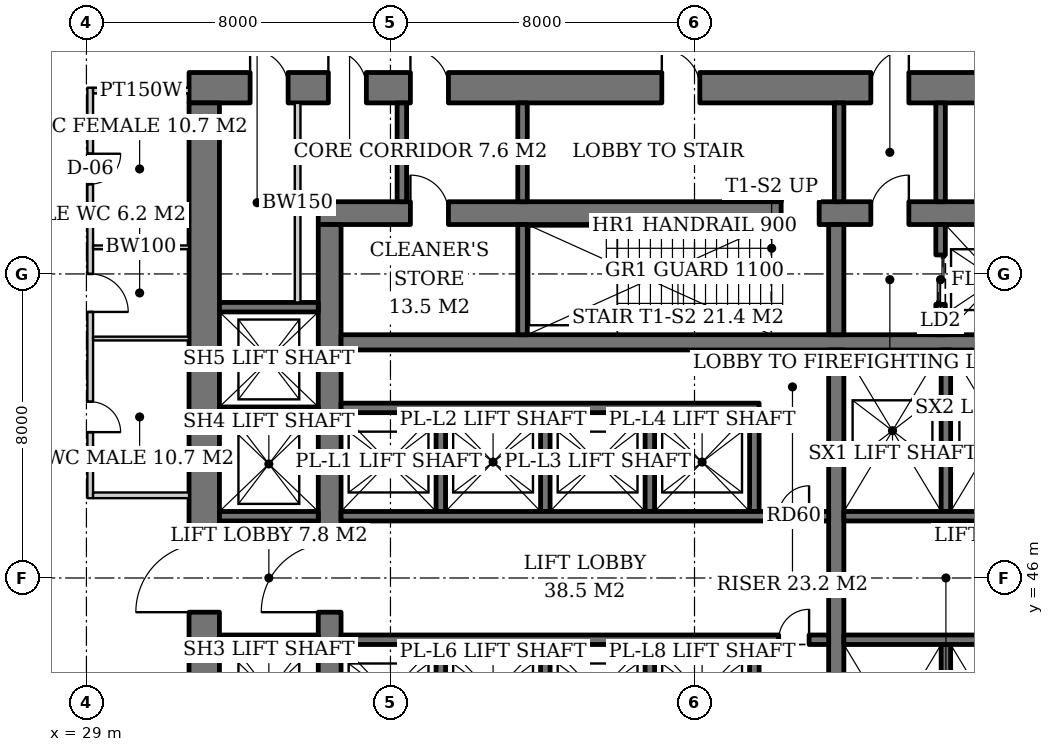
"""IFC4 building model, lengths in metres.
Left out: names, types, materials, properties, quantities, classifications, styles, units other than length and angle.
Written with IfcOpenShell. Run it as: python <this file> out.ifc"""

import sys

from ifc_helpers import new_model, si_unit, direction, frame, frame_2d, origin, place, context, subcontext, project, spatial, rectangle, extrude, element, fill, save


model = new_model("IFC4")
c1 = context("Model", 3, precision=1e-05, world=origin(), true_north=direction((0.0, 1.0)))
c2 = subcontext(c1, "Body", "Model", "MODEL_VIEW")
j1 = project(units=[si_unit("LENGTHUNIT", "METRE"), si_unit("PLANEANGLEUNIT", "RADIAN")], contexts=[c1])
p1 = place(None, origin())
s1 = spatial("IfcSite", under=j1, at=p1, CompositionType="ELEMENT")
p2 = place(p1, origin())
s2 = spatial("IfcBuilding", under=s1, at=p2, CompositionType="ELEMENT")
p3 = place(p2, frame((0.0, 0.0, 11.0)))
s3 = spatial("IfcBuildingStorey", under=s2, at=p3, CompositionType="ELEMENT", Elevation=11.0)
p4 = place(p3, frame((35.1, 55.6, 0.0), z_axis=(0.0, 0.0, 1.0), x_axis=(1.0, 0.0, 0.0)))
e1 = element("IfcWall", 1, at=p4, inside=s3, PredefinedType="SHEAR", context=c2, shape_type="SweptSolid", body=[
    extrude(rectangle(XDim=19.8, YDim=0.6, at=frame_2d((9.9, 0.0))), origin(), (0.0, 0.0, 1.0), 5.0),
])
p5 = place(p4, frame((14.54, 0.0, 0.0)))
e2 = element("IfcOpeningElement", 2, at=p5, cuts=e1, PredefinedType="OPENING", context=c2, shape_type="SweptSolid", body=[
    extrude(rectangle(XDim=1.0, YDim=2.1, at=frame_2d((0.5, 1.05))), frame((0.0, 0.31, 0.0), z_axis=(0.0, -1.0, 0.0), x_axis=(1.0, 0.0, 0.0)), (0.0, 0.0, 1.0), 0.62),
])
p6 = place(p4, frame((12.18, 0.0, 0.0)))
e3 = element("IfcOpeningElement", 3, at=p6, cuts=e1, PredefinedType="OPENING", context=c2, shape_type="SweptSolid", body=[
    extrude(rectangle(XDim=1.0, YDim=2.1, at=frame_2d((0.5, 1.05))), frame((0.0, 0.31, 0.0), z_axis=(0.0, -1.0, 0.0), x_axis=(1.0, 0.0, 0.0)), (0.0, 0.0, 1.0), 0.62),
])
p7 = place(p4, frame((2.425, 0.0, 0.0)))
e4 = element("IfcOpeningElement", 4, at=p7, cuts=e1, PredefinedType="OPENING", context=c2, shape_type="SweptSolid", body=[
    extrude(rectangle(XDim=1.0, YDim=2.1, at=frame_2d((0.5, 1.05))), frame((0.0, 0.31, 0.0), z_axis=(0.0, -1.0, 0.0), x_axis=(1.0, 0.0, 0.0)), (0.0, 0.0, 1.0), 0.62),
])
p8 = place(p3, frame((35.4, 36.7, 0.0), z_axis=(0.0, 0.0, 1.0), x_axis=(0.0, 1.0, 0.0)))
e5 = element("IfcWall", 5, at=p8, inside=s3, PredefinedType="SHEAR", context=c2, shape_type="SweptSolid", body=[
    extrude(rectangle(XDim=18.6, YDim=0.6, at=frame_2d((9.3, 0.0))), origin(), (0.0, 0.0, 1.0), 5.0),
])
p9 = place(p8, frame((8.4, 0.0, 0.0)))
e6 = element("IfcOpeningElement", 6, at=p9, cuts=e5, PredefinedType="OPENING", context=c2, shape_type="SweptSolid", body=[
    extrude(rectangle(XDim=1.8, YDim=2.4, at=frame_2d((0.9, 1.2))), frame((0.0, 0.31, 0.0), z_axis=(0.0, -1.0, 0.0), x_axis=(1.0, 0.0, 0.0)), (0.0, 0.0, 1.0), 0.62),
])
p10 = place(p3, frame((31.7, 58.9, 0.0), z_axis=(0.0, 0.0, 1.0), x_axis=(1.0, 0.0, 0.0)))
e7 = element("IfcWall", 7, at=p10, inside=s3, PredefinedType="SHEAR", context=c2, shape_type="SweptSolid", body=[
    extrude(rectangle(XDim=26.6, YDim=0.8, at=frame_2d((13.3, 0.0))), origin(), (0.0, 0.0, 1.0), 5.0),
])
p11 = place(p10, frame((17.94, 0.0, 0.0)))
e8 = element("IfcOpeningElement", 8, at=p11, cuts=e7, PredefinedType="OPENING", context=c2, shape_type="SweptSolid", body=[
    extrude(rectangle(XDim=1.0, YDim=2.1, at=frame_2d((0.5, 1.05))), frame((0.0, 0.41, 0.0), z_axis=(0.0, -1.0, 0.0), x_axis=(1.0, 0.0, 0.0)), (0.0, 0.0, 1.0), 0.82),
])
p12 = place(p10, frame((12.44, 0.0, 0.0)))
e9 = element("IfcOpeningElement", 9, at=p12, cuts=e7, PredefinedType="OPENING", context=c2, shape_type="SweptSolid", body=[
    extrude(rectangle(XDim=1.0, YDim=2.1, at=frame_2d((0.5, 1.05))), frame((0.0, 0.41, 0.0), z_axis=(0.0, -1.0, 0.0), x_axis=(1.0, 0.0, 0.0)), (0.0, 0.0, 1.0), 0.82),
])
p13 = place(p10, frame((5.825, 0.0, 0.0)))
e10 = element("IfcOpeningElement", 10, at=p13, cuts=e7, PredefinedType="OPENING", context=c2, shape_type="SweptSolid", body=[
    extrude(rectangle(XDim=1.0, YDim=2.1, at=frame_2d((0.5, 1.05))), frame((0.0, 0.41, 0.0), z_axis=(0.0, -1.0, 0.0), x_axis=(1.0, 0.0, 0.0)), (0.0, 0.0, 1.0), 0.82),
])
p14 = place(p10, frame((1.607, 0.0, 0.0)))
e11 = element("IfcOpeningElement", 11, at=p14, cuts=e7, PredefinedType="OPENING", context=c2, shape_type="SweptSolid", body=[
    extrude(rectangle(XDim=1.0, YDim=2.1, at=frame_2d((0.5, 1.05))), frame((0.0, 0.41, 0.0), z_axis=(0.0, -1.0, 0.0), x_axis=(1.0, 0.0, 0.0)), (0.0, 0.0, 1.0), 0.82),
])
p15 = place(p10, frame((3.666, 0.0, 0.0)))
e12 = element("IfcOpeningElement", 12, at=p15, cuts=e7, PredefinedType="OPENING", context=c2, shape_type="SweptSolid", body=[
    extrude(rectangle(XDim=1.0, YDim=2.1, at=frame_2d((0.5, 1.05))), frame((0.0, 0.41, 0.0), z_axis=(0.0, -1.0, 0.0), x_axis=(1.0, 0.0, 0.0)), (0.0, 0.0, 1.0), 0.82),
])
p16 = place(p10, frame((22.35, 0.0, 0.0)))
e13 = element("IfcOpeningElement", 13, at=p16, cuts=e7, PredefinedType="OPENING", context=c2, shape_type="SweptSolid", body=[
    extrude(rectangle(XDim=1.0, YDim=2.1, at=frame_2d((0.5, 1.05))), frame((0.0, 0.41, 0.0), z_axis=(0.0, -1.0, 0.0), x_axis=(1.0, 0.0, 0.0)), (0.0, 0.0, 1.0), 0.82),
])
p17 = place(p3, frame((32.1, 33.5, 0.0), z_axis=(0.0, 0.0, 1.0), x_axis=(0.0, 1.0, 0.0)))
e14 = element("IfcWall", 14, at=p17, inside=s3, PredefinedType="SHEAR", context=c2, shape_type="SweptSolid", body=[
    extrude(rectangle(XDim=25.0, YDim=0.8, at=frame_2d((12.5, 0.0))), origin(), (0.0, 0.0, 1.0), 5.0),
])
p18 = place(p17, frame((11.6, 0.0, 0.0)))
e15 = element("IfcOpeningElement", 15, at=p18, cuts=e14, PredefinedType="OPENING", context=c2, shape_type="SweptSolid", body=[
    extrude(rectangle(XDim=1.8, YDim=2.4, at=frame_2d((0.9, 1.2))), frame((0.0, 0.41, 0.0), z_axis=(0.0, -1.0, 0.0), x_axis=(1.0, 0.0, 0.0)), (0.0, 0.0, 1.0), 0.82),
])
p19 = place(p3, frame((35.7, 52.2, 0.0), z_axis=(0.0, 0.0, 1.0), x_axis=(1.0, 0.0, 0.0)))
e16 = element("IfcWall", 16, at=p19, inside=s3, PredefinedType="SHEAR", context=c2, shape_type="SweptSolid", body=[
    extrude(rectangle(XDim=18.6, YDim=0.4, at=frame_2d((9.3, 0.0))), origin(), (0.0, 0.0, 1.0), 5.0),
])
p20 = place(p3, frame((48.73, 40.0, 0.0), z_axis=(0.0, 0.0, 1.0), x_axis=(0.0, 1.0, 0.0)))
e17 = element("IfcWall", 17, at=p20, inside=s3, PredefinedType="SHEAR", context=c2, shape_type="SweptSolid", body=[
    extrude(rectangle(XDim=12.0, YDim=0.4, at=frame_2d((6.0, 0.0))), origin(), (0.0, 0.0, 1.0), 5.0),
])
p21 = place(p3, frame((48.73, 52.4, 0.0), z_axis=(0.0, 0.0, 1.0), x_axis=(0.0, 1.0, 0.0)))
e18 = element("IfcWall", 18, at=p21, inside=s3, PredefinedType="SHEAR", context=c2, shape_type="SweptSolid", body=[
    extrude(rectangle(XDim=2.9, YDim=0.4, at=frame_2d((1.45, 0.0))), origin(), (0.0, 0.0, 1.0), 5.0),
])
p22 = place(p3, frame((40.475, 52.4, 0.0), z_axis=(0.0, 0.0, 1.0), x_axis=(0.0, 1.0, 0.0)))
e19 = element("IfcWall", 19, at=p22, inside=s3, PredefinedType="SHEAR", context=c2, shape_type="SweptSolid", body=[
    extrude(rectangle(XDim=2.9, YDim=0.25, at=frame_2d((1.45, 0.0))), origin(), (0.0, 0.0, 1.0), 5.0),
])
p23 = place(p3, frame((51.475, 52.4, 0.0), z_axis=(0.0, 0.0, 1.0), x_axis=(0.0, 1.0, 0.0)))
e20 = element("IfcWall", 20, at=p23, inside=s3, PredefinedType="SHEAR", context=c2, shape_type="SweptSolid", body=[
    extrude(rectangle(XDim=2.9, YDim=0.25, at=frame_2d((1.45, 0.0))), origin(), (0.0, 0.0, 1.0), 5.0),
])
p24 = place(p23, frame((0.8, 0.0, 0.0)))
e21 = element("IfcOpeningElement", 21, at=p24, cuts=e20, PredefinedType="OPENING", context=c2, shape_type="SweptSolid", body=[
    extrude(rectangle(XDim=1.3, YDim=2.2, at=frame_2d((0.65, 1.1))), frame((0.0, 0.135, 0.0), z_axis=(0.0, -1.0, 0.0), x_axis=(1.0, 0.0, 0.0)), (0.0, 0.0, 1.0), 0.27),
])
for number, where, z_axis, x_axis in (
    (22, (38.325, 47.75, 0.0), (0.0, 0.0, 1.0), (0.0, 1.0, 0.0)),
    (23, (41.075, 47.75, 0.0), (0.0, 0.0, 1.0), (0.0, 1.0, 0.0)),
    (24, (43.825, 47.75, 0.0), (0.0, 0.0, 1.0), (0.0, 1.0, 0.0)),
    (25, (46.575, 47.75, 0.0), (0.0, 0.0, 1.0), (0.0, 1.0, 0.0)),
):
    element("IfcWall", number, at=place(p3, frame(where, z_axis=z_axis, x_axis=x_axis)), inside=s3, PredefinedType="SHEAR", context=c2, shape_type="SweptSolid", body=[
        extrude(rectangle(XDim=2.6, YDim=0.25, at=frame_2d((1.3, 0.0))), origin(), (0.0, 0.0, 1.0), 5.0),
    ])
p25 = place(p3, frame((35.7, 50.475, 0.0), z_axis=(0.0, 0.0, 1.0), x_axis=(1.0, 0.0, 0.0)))
e26 = element("IfcWall", 26, at=p25, inside=s3, PredefinedType="SHEAR", context=c2, shape_type="SweptSolid", body=[
    extrude(rectangle(XDim=11.0, YDim=0.25, at=frame_2d((5.5, 0.0))), origin(), (0.0, 0.0, 1.0), 5.0),
])
p26 = place(p3, frame((35.7, 47.625, 0.0), z_axis=(0.0, 0.0, 1.0), x_axis=(1.0, 0.0, 0.0)))
e27 = element("IfcWall", 27, at=p26, inside=s3, PredefinedType="SHEAR", context=c2, shape_type="SweptSolid", body=[
    extrude(rectangle(XDim=12.83, YDim=0.25, at=frame_2d((6.415, 0.0))), origin(), (0.0, 0.0, 1.0), 5.0),
])
p27 = place(p26, frame((11.515, 0.0, 0.0)))
e28 = element("IfcOpeningElement", 28, at=p27, cuts=e27, PredefinedType="OPENING", context=c2, shape_type="SweptSolid", body=[
    extrude(rectangle(XDim=0.8, YDim=2.0, at=frame_2d((0.4, 1.0))), frame((0.0, 0.135, 0.0), z_axis=(0.0, -1.0, 0.0), x_axis=(1.0, 0.0, 0.0)), (0.0, 0.0, 1.0), 0.27),
])
for number, where, z_axis, x_axis in (
    (29, (38.325, 44.25, 0.0), (0.0, 0.0, 1.0), (0.0, -1.0, 0.0)),
    (30, (41.075, 44.25, 0.0), (0.0, 0.0, 1.0), (0.0, -1.0, 0.0)),
    (31, (43.825, 44.25, 0.0), (0.0, 0.0, 1.0), (0.0, -1.0, 0.0)),
    (32, (46.575, 44.25, 0.0), (0.0, 0.0, 1.0), (0.0, -1.0, 0.0)),
):
    element("IfcWall", number, at=place(p3, frame(where, z_axis=z_axis, x_axis=x_axis)), inside=s3, PredefinedType="SHEAR", context=c2, shape_type="SweptSolid", body=[
        extrude(rectangle(XDim=2.6, YDim=0.25, at=frame_2d((1.3, 0.0))), origin(), (0.0, 0.0, 1.0), 5.0),
    ])
p28 = place(p3, frame((35.7, 44.375, 0.0), z_axis=(0.0, 0.0, 1.0), x_axis=(1.0, 0.0, 0.0)))
e33 = element("IfcWall", 33, at=p28, inside=s3, PredefinedType="SHEAR", context=c2, shape_type="SweptSolid", body=[
    extrude(rectangle(XDim=12.83, YDim=0.25, at=frame_2d((6.415, 0.0))), origin(), (0.0, 0.0, 1.0), 5.0),
])
p29 = place(p28, frame((11.515, 0.0, 0.0)))
e34 = element("IfcOpeningElement", 34, at=p29, cuts=e33, PredefinedType="OPENING", context=c2, shape_type="SweptSolid", body=[
    extrude(rectangle(XDim=0.8, YDim=2.0, at=frame_2d((0.4, 1.0))), frame((0.0, 0.135, 0.0), z_axis=(0.0, -1.0, 0.0), x_axis=(1.0, 0.0, 0.0)), (0.0, 0.0, 1.0), 0.27),
])
p30 = place(p3, frame((51.615, 47.75, 0.0), z_axis=(0.0, 0.0, 1.0), x_axis=(0.0, 1.0, 0.0)))
e35 = element("IfcWall", 35, at=p30, inside=s3, PredefinedType="SHEAR", context=c2, shape_type="SweptSolid", body=[
    extrude(rectangle(XDim=4.25, YDim=0.25, at=frame_2d((2.125, 0.0))), origin(), (0.0, 0.0, 1.0), 5.0),
])
p31 = place(p3, frame((48.93, 47.625, 0.0), z_axis=(0.0, 0.0, 1.0), x_axis=(1.0, 0.0, 0.0)))
e36 = element("IfcWall", 36, at=p31, inside=s3, PredefinedType="SHEAR", context=c2, shape_type="SweptSolid", body=[
    extrude(rectangle(XDim=5.37, YDim=0.25, at=frame_2d((2.685, 0.0))), origin(), (0.0, 0.0, 1.0), 5.0),
])
p32 = place(p3, frame((51.615, 44.25, 0.0), z_axis=(0.0, 0.0, 1.0), x_axis=(0.0, -1.0, 0.0)))
e37 = element("IfcWall", 37, at=p32, inside=s3, PredefinedType="SHEAR", context=c2, shape_type="SweptSolid", body=[
    extrude(rectangle(XDim=4.25, YDim=0.25, at=frame_2d((2.125, 0.0))), origin(), (0.0, 0.0, 1.0), 5.0),
])
p33 = place(p3, frame((48.93, 44.375, 0.0), z_axis=(0.0, 0.0, 1.0), x_axis=(1.0, 0.0, 0.0)))
e38 = element("IfcWall", 38, at=p33, inside=s3, PredefinedType="SHEAR", context=c2, shape_type="SweptSolid", body=[
    extrude(rectangle(XDim=5.37, YDim=0.25, at=frame_2d((2.685, 0.0))), origin(), (0.0, 0.0, 1.0), 5.0),
])
for number, where, z_axis, x_axis in (
    (39, (32.5, 44.375, 0.0), (0.0, 0.0, 1.0), (1.0, 0.0, 0.0)),
    (40, (32.5, 47.625, 0.0), (0.0, 0.0, 1.0), (1.0, 0.0, 0.0)),
    (41, (32.5, 50.375, 0.0), (0.0, 0.0, 1.0), (1.0, 0.0, 0.0)),
    (42, (32.5, 53.125, 0.0), (0.0, 0.0, 1.0), (1.0, 0.0, 0.0)),
):
    element("IfcWall", number, at=place(p3, frame(where, z_axis=z_axis, x_axis=x_axis)), inside=s3, PredefinedType="SHEAR", context=c2, shape_type="SweptSolid", body=[
        extrude(rectangle(XDim=2.6, YDim=0.25, at=frame_2d((1.3, 0.0))), origin(), (0.0, 0.0, 1.0), 5.0),
    ])
for number, where, z_axis, x_axis in (
    (43, (48.805, 55.9, 0.0), (0.0, 0.0, 1.0), (0.0, 1.0, 0.0)),
    (44, (51.475, 55.9, 0.0), (0.0, 0.0, 1.0), (0.0, 1.0, 0.0)),
    (45, (40.475, 55.9, 0.0), (0.0, 0.0, 1.0), (0.0, 1.0, 0.0)),
    (46, (37.3, 55.9, 0.0), (0.0, 0.0, 1.0), (0.0, 1.0, 0.0)),
):
    element("IfcWall", number, at=place(p3, frame(where, z_axis=z_axis, x_axis=x_axis)), inside=s3, PredefinedType="SOLIDWALL", context=c2, shape_type="SweptSolid", body=[
        extrude(rectangle(XDim=2.6, YDim=0.25, at=frame_2d((1.3, 0.0))), origin(), (0.0, 0.0, 1.0), 4.7),
    ])
p34 = place(p3, frame((34.557, 53.25, 0.0), z_axis=(0.0, 0.0, 1.0), x_axis=(0.0, 1.0, 0.0)))
e47 = element("IfcWall", 47, at=p34, inside=s3, PredefinedType="SOLIDWALL", context=c2, shape_type="SweptSolid", body=[
    extrude(rectangle(XDim=5.25, YDim=0.15, at=frame_2d((2.625, 0.0))), origin(), (0.0, 0.0, 1.0), 4.7),
])
p35 = place(p3, frame((29.1, 58.9, 0.0), z_axis=(0.0, 0.0, 1.0), x_axis=(0.0, -1.0, 0.0)))
e48 = element("IfcWall", 48, at=p35, inside=s3, PredefinedType="PARTITIONING", context=c2, shape_type="SweptSolid", body=[
    extrude(rectangle(XDim=10.8, YDim=0.15, at=frame_2d((5.4, 0.0))), origin(), (0.0, 0.0, 1.0), 3.688),
])
p36 = place(p35, frame((1.738, 0.0, 0.0)))
e49 = element("IfcOpeningElement", 49, at=p36, cuts=e48, PredefinedType="OPENING", context=c2, shape_type="SweptSolid", body=[
    extrude(rectangle(XDim=0.8, YDim=2.1, at=frame_2d((0.4, 1.05))), frame((0.0, 0.085, 0.0), z_axis=(0.0, -1.0, 0.0), x_axis=(1.0, 0.0, 0.0)), (0.0, 0.0, 1.0), 0.17),
])
p37 = place(p35, frame((4.9, 0.0, 0.0)))
e50 = element("IfcOpeningElement", 50, at=p37, cuts=e48, PredefinedType="OPENING", context=c2, shape_type="SweptSolid", body=[
    extrude(rectangle(XDim=1.0, YDim=2.1, at=frame_2d((0.5, 1.05))), frame((0.0, 0.085, 0.0), z_axis=(0.0, -1.0, 0.0), x_axis=(1.0, 0.0, 0.0)), (0.0, 0.0, 1.0), 0.17),
])
p38 = place(p35, frame((8.262, 0.0, 0.0)))
e51 = element("IfcOpeningElement", 51, at=p38, cuts=e48, PredefinedType="OPENING", context=c2, shape_type="SweptSolid", body=[
    extrude(rectangle(XDim=0.8, YDim=2.1, at=frame_2d((0.4, 1.05))), frame((0.0, 0.085, 0.0), z_axis=(0.0, -1.0, 0.0), x_axis=(1.0, 0.0, 0.0)), (0.0, 0.0, 1.0), 0.17),
])
p39 = place(p3, frame((29.175, 58.825, 0.0), z_axis=(0.0, 0.0, 1.0), x_axis=(1.0, 0.0, 0.0)))
e52 = element("IfcWall", 52, at=p39, inside=s3, PredefinedType="PARTITIONING", context=c2, shape_type="SweptSolid", body=[
    extrude(rectangle(XDim=2.525, YDim=0.15, at=frame_2d((1.262, 0.0))), origin(), (0.0, 0.0, 1.0), 3.688),
])
p40 = place(p3, frame((29.175, 54.7, 0.0), z_axis=(0.0, 0.0, 1.0), x_axis=(1.0, 0.0, 0.0)))
e53 = element("IfcWall", 53, at=p40, inside=s3, PredefinedType="SOLIDWALL", context=c2, shape_type="SweptSolid", body=[
    extrude(rectangle(XDim=2.525, YDim=0.1, at=frame_2d((1.262, 0.0))), origin(), (0.0, 0.0, 1.0), 3.9),
])
p41 = place(p3, frame((29.175, 52.3, 0.0), z_axis=(0.0, 0.0, 1.0), x_axis=(1.0, 0.0, 0.0)))
e54 = element("IfcWall", 54, at=p41, inside=s3, PredefinedType="SOLIDWALL", context=c2, shape_type="SweptSolid", body=[
    extrude(rectangle(XDim=2.525, YDim=0.1, at=frame_2d((1.262, 0.0))), origin(), (0.0, 0.0, 1.0), 4.7),
])
p42 = place(p3, frame((29.175, 48.175, 0.0), z_axis=(0.0, 0.0, 1.0), x_axis=(1.0, 0.0, 0.0)))
e55 = element("IfcWall", 55, at=p42, inside=s3, PredefinedType="PARTITIONING", context=c2, shape_type="SweptSolid", body=[
    extrude(rectangle(XDim=2.525, YDim=0.15, at=frame_2d((1.262, 0.0))), origin(), (0.0, 0.0, 1.0), 4.7),
])
p43 = place(p24, origin())
e56 = element("IfcDoor", 56, at=p43, inside=s3, OperationType="DOUBLE_DOOR_SLIDING", PredefinedType="DOOR", context=c2, shape_type="SweptSolid", body=[
    extrude(rectangle(XDim=1.3, YDim=2.2, at=frame_2d((0.65, 1.1))), frame((0.0, 0.025, 0.0), z_axis=(0.0, -1.0, 0.0), x_axis=(1.0, 0.0, 0.0)), (0.0, 0.0, 1.0), 0.05),
])
fill(e21, e56)
p44 = place(p27, origin())
e57 = element("IfcDoor", 57, at=p44, inside=s3, OperationType="SINGLE_SWING_RIGHT", PredefinedType="DOOR", context=c2, shape_type="SweptSolid", body=[
    extrude(rectangle(XDim=0.8, YDim=2.0, at=frame_2d((0.4, 1.0))), frame((0.0, 0.025, 0.0), z_axis=(0.0, -1.0, 0.0), x_axis=(1.0, 0.0, 0.0)), (0.0, 0.0, 1.0), 0.05),
])
fill(e28, e57)
p45 = place(p29, origin())
e58 = element("IfcDoor", 58, at=p45, inside=s3, OperationType="SINGLE_SWING_RIGHT", PredefinedType="DOOR", context=c2, shape_type="SweptSolid", body=[
    extrude(rectangle(XDim=0.8, YDim=2.0, at=frame_2d((0.4, 1.0))), frame((0.0, 0.025, 0.0), z_axis=(0.0, -1.0, 0.0), x_axis=(1.0, 0.0, 0.0)), (0.0, 0.0, 1.0), 0.05),
])
fill(e34, e58)
p46 = place(p5, origin())
e59 = element("IfcDoor", 59, at=p46, inside=s3, OperationType="SINGLE_SWING_RIGHT", PredefinedType="DOOR", context=c2, shape_type="SweptSolid", body=[
    extrude(rectangle(XDim=1.0, YDim=2.1, at=frame_2d((0.5, 1.05))), frame((0.0, 0.025, 0.0), z_axis=(0.0, -1.0, 0.0), x_axis=(1.0, 0.0, 0.0)), (0.0, 0.0, 1.0), 0.05),
])
fill(e2, e59)
p47 = place(p9, origin())
e60 = element("IfcDoor", 60, at=p47, inside=s3, OperationType="DOUBLE_DOOR_SINGLE_SWING", PredefinedType="DOOR", context=c2, shape_type="SweptSolid", body=[
    extrude(rectangle(XDim=1.8, YDim=2.4, at=frame_2d((0.9, 1.2))), frame((0.0, 0.025, 0.0), z_axis=(0.0, -1.0, 0.0), x_axis=(1.0, 0.0, 0.0)), (0.0, 0.0, 1.0), 0.05),
])
fill(e6, e60)
p48 = place(p6, origin())
e61 = element("IfcDoor", 61, at=p48, inside=s3, OperationType="SINGLE_SWING_RIGHT", PredefinedType="DOOR", context=c2, shape_type="SweptSolid", body=[
    extrude(rectangle(XDim=1.0, YDim=2.1, at=frame_2d((0.5, 1.05))), frame((0.0, 0.025, 0.0), z_axis=(0.0, -1.0, 0.0), x_axis=(1.0, 0.0, 0.0)), (0.0, 0.0, 1.0), 0.05),
])
fill(e3, e61)
p49 = place(p18, origin())
e62 = element("IfcDoor", 62, at=p49, inside=s3, OperationType="DOUBLE_DOOR_SINGLE_SWING", PredefinedType="DOOR", context=c2, shape_type="SweptSolid", body=[
    extrude(rectangle(XDim=1.8, YDim=2.4, at=frame_2d((0.9, 1.2))), frame((0.0, 0.025, 0.0), z_axis=(0.0, -1.0, 0.0), x_axis=(1.0, 0.0, 0.0)), (0.0, 0.0, 1.0), 0.05),
])
fill(e15, e62)
p50 = place(p11, origin())
e63 = element("IfcDoor", 63, at=p50, inside=s3, OperationType="SINGLE_SWING_RIGHT", PredefinedType="DOOR", context=c2, shape_type="SweptSolid", body=[
    extrude(rectangle(XDim=1.0, YDim=2.1, at=frame_2d((0.5, 1.05))), frame((0.0, 0.025, 0.0), z_axis=(0.0, -1.0, 0.0), x_axis=(1.0, 0.0, 0.0)), (0.0, 0.0, 1.0), 0.05),
])
fill(e8, e63)
p51 = place(p12, origin())
e64 = element("IfcDoor", 64, at=p51, inside=s3, OperationType="SINGLE_SWING_LEFT", PredefinedType="DOOR", context=c2, shape_type="SweptSolid", body=[
    extrude(rectangle(XDim=1.0, YDim=2.1, at=frame_2d((0.5, 1.05))), frame((0.0, 0.025, 0.0), z_axis=(0.0, -1.0, 0.0), x_axis=(1.0, 0.0, 0.0)), (0.0, 0.0, 1.0), 0.05),
])
fill(e9, e64)
p52 = place(p13, origin())
e65 = element("IfcDoor", 65, at=p52, inside=s3, OperationType="SINGLE_SWING_LEFT", PredefinedType="DOOR", context=c2, shape_type="SweptSolid", body=[
    extrude(rectangle(XDim=1.0, YDim=2.1, at=frame_2d((0.5, 1.05))), frame((0.0, 0.025, 0.0), z_axis=(0.0, -1.0, 0.0), x_axis=(1.0, 0.0, 0.0)), (0.0, 0.0, 1.0), 0.05),
])
fill(e10, e65)
p53 = place(p7, origin())
e66 = element("IfcDoor", 66, at=p53, inside=s3, OperationType="SINGLE_SWING_LEFT", PredefinedType="DOOR", context=c2, shape_type="SweptSolid", body=[
    extrude(rectangle(XDim=1.0, YDim=2.1, at=frame_2d((0.5, 1.05))), frame((0.0, -0.24, 0.0), z_axis=(0.0, -1.0, 0.0), x_axis=(1.0, 0.0, 0.0)), (0.0, 0.0, 1.0), 0.05),
])
fill(e4, e66)
p54 = place(p14, origin())
e67 = element("IfcDoor", 67, at=p54, inside=s3, OperationType="SINGLE_SWING_LEFT", PredefinedType="DOOR", context=c2, shape_type="SweptSolid", body=[
    extrude(rectangle(XDim=1.0, YDim=2.1, at=frame_2d((0.5, 1.05))), frame((0.0, -0.34, 0.0), z_axis=(0.0, -1.0, 0.0), x_axis=(1.0, 0.0, 0.0)), (0.0, 0.0, 1.0), 0.05),
])
fill(e11, e67)
p55 = place(p15, origin())
e68 = element("IfcDoor", 68, at=p55, inside=s3, OperationType="SINGLE_SWING_LEFT", PredefinedType="DOOR", context=c2, shape_type="SweptSolid", body=[
    extrude(rectangle(XDim=1.0, YDim=2.1, at=frame_2d((0.5, 1.05))), frame((0.0, -0.34, 0.0), z_axis=(0.0, -1.0, 0.0), x_axis=(1.0, 0.0, 0.0)), (0.0, 0.0, 1.0), 0.05),
])
fill(e12, e68)
p56 = place(p36, origin())
e69 = element("IfcDoor", 69, at=p56, inside=s3, OperationType="SINGLE_SWING_LEFT", PredefinedType="DOOR", context=c2, shape_type="SweptSolid", body=[
    extrude(rectangle(XDim=0.8, YDim=2.1, at=frame_2d((0.4, 1.05))), frame((0.0, 0.025, 0.0), z_axis=(0.0, -1.0, 0.0), x_axis=(1.0, 0.0, 0.0)), (0.0, 0.0, 1.0), 0.05),
])
fill(e49, e69)
p57 = place(p37, origin())
e70 = element("IfcDoor", 70, at=p57, inside=s3, OperationType="SINGLE_SWING_RIGHT", PredefinedType="DOOR", context=c2, shape_type="SweptSolid", body=[
    extrude(rectangle(XDim=1.0, YDim=2.1, at=frame_2d((0.5, 1.05))), frame((0.0, 0.025, 0.0), z_axis=(0.0, -1.0, 0.0), x_axis=(1.0, 0.0, 0.0)), (0.0, 0.0, 1.0), 0.05),
])
fill(e50, e70)
p58 = place(p38, origin())
e71 = element("IfcDoor", 71, at=p58, inside=s3, OperationType="SINGLE_SWING_RIGHT", PredefinedType="DOOR", context=c2, shape_type="SweptSolid", body=[
    extrude(rectangle(XDim=0.8, YDim=2.1, at=frame_2d((0.4, 1.05))), frame((0.0, 0.025, 0.0), z_axis=(0.0, -1.0, 0.0), x_axis=(1.0, 0.0, 0.0)), (0.0, 0.0, 1.0), 0.05),
])
fill(e51, e71)
save(model, sys.argv[1])
